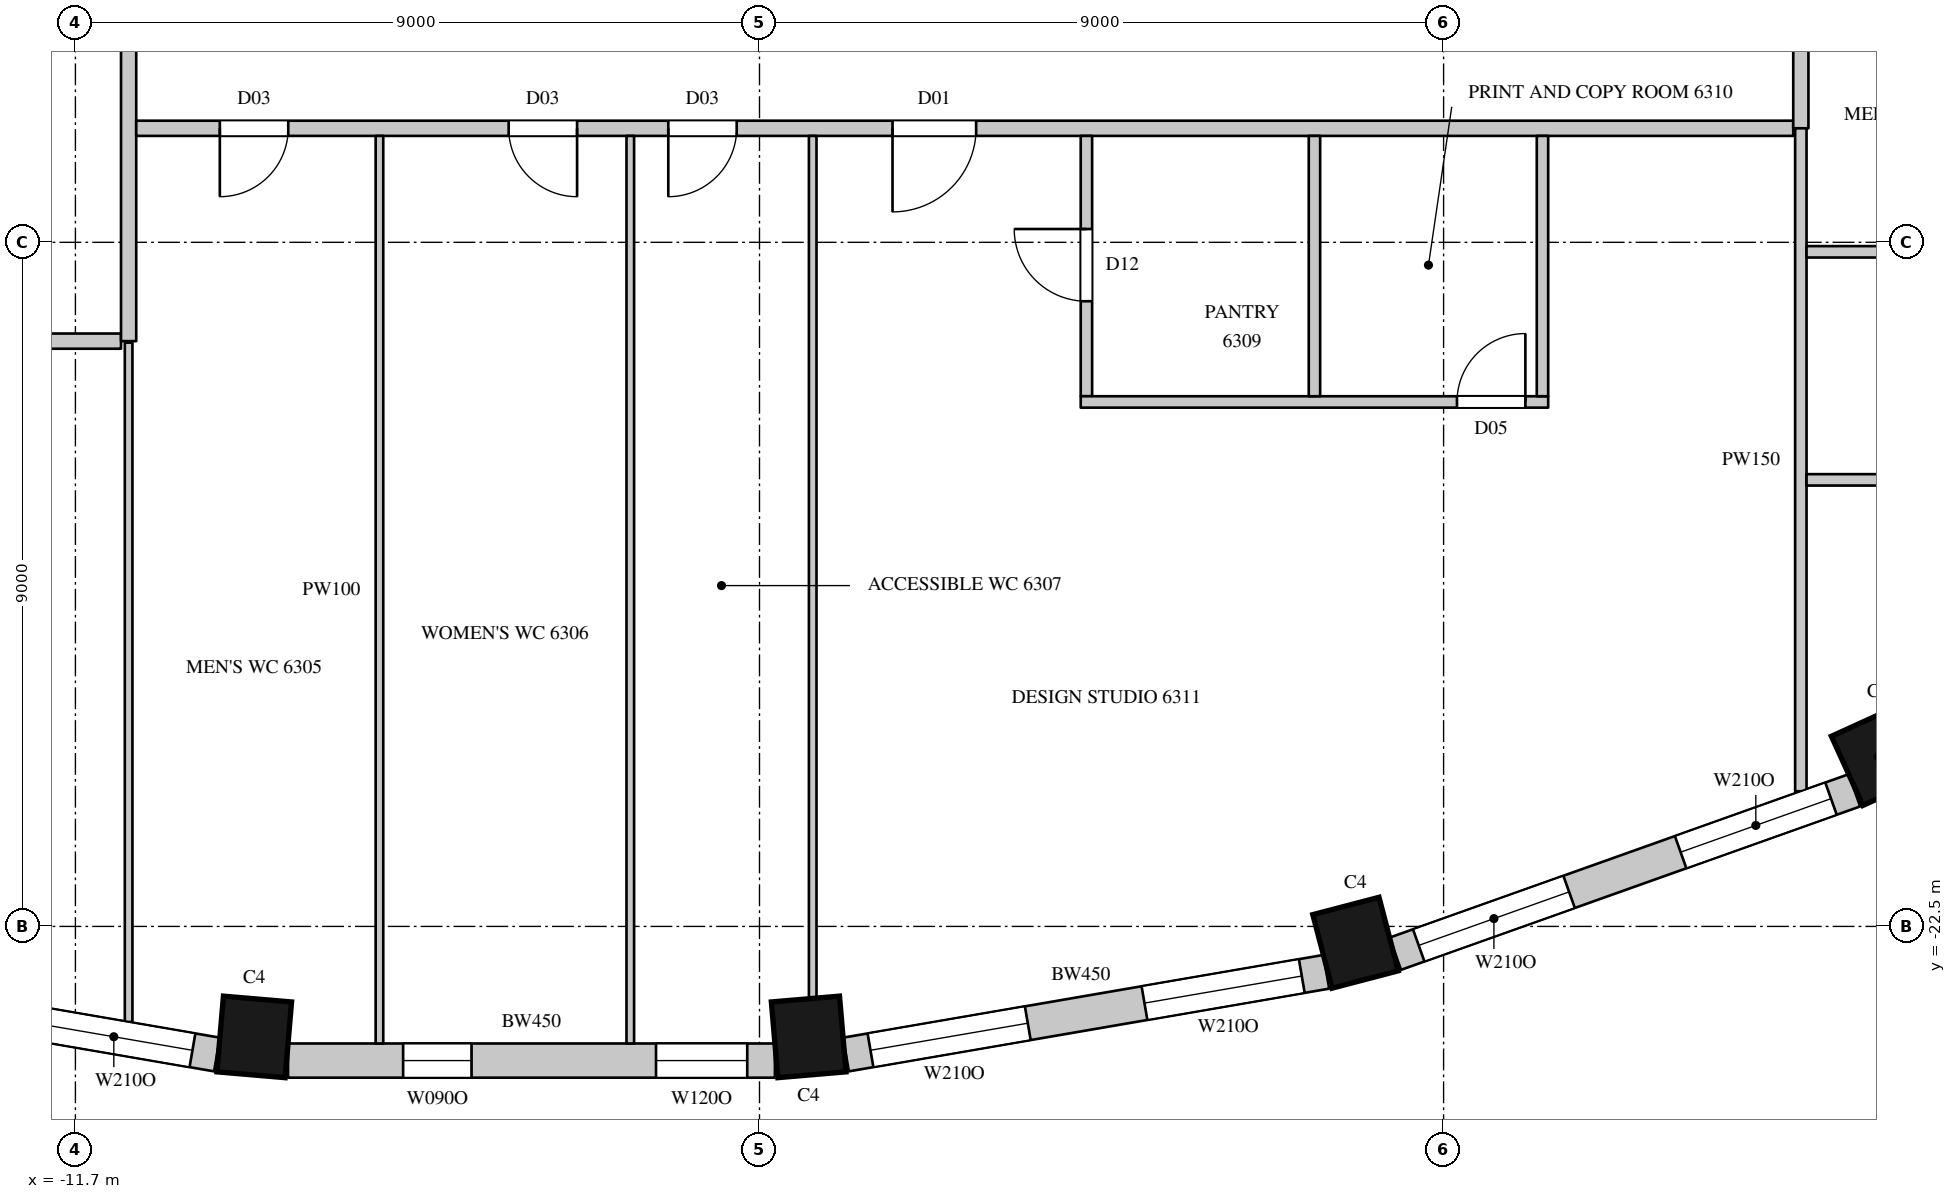
"""IFC4 building model, lengths in metres.
Left out: names, types, materials, properties, quantities, classifications, styles, units other than length and angle.
Written with IfcOpenShell. Run it as: python <this file> out.ifc"""

import sys

from ifc_helpers import new_model, si_unit, direction, frame, frame_2d, origin, origin_2d, place, context, subcontext, project, spatial, rectangle, extrude, element, fill, save


model = new_model("IFC4")
c1 = context("Model", 3, precision=1e-05, world=origin(), true_north=direction((0.0, 1.0)))
c2 = subcontext(c1, "Body", "Model", "MODEL_VIEW")
j1 = project(units=[si_unit("LENGTHUNIT", "METRE"), si_unit("PLANEANGLEUNIT", "RADIAN")], contexts=[c1])
p1 = place(None, origin())
s1 = spatial("IfcSite", under=j1, at=p1, CompositionType="ELEMENT")
p2 = place(p1, origin())
s2 = spatial("IfcBuilding", under=s1, at=p2, CompositionType="ELEMENT")
p3 = place(p2, frame((0.0, 0.0, 280.3)))
s3 = spatial("IfcBuildingStorey", under=s2, at=p3, CompositionType="ELEMENT", Elevation=280.3)
for number, where, z_axis, x_axis in (
    (1, (-9.347, -23.954, 0.0), (0.0, 0.0, 1.0), (0.996, -0.085, 0.0)),
    (2, (-2.053, -23.954, 0.0), (0.0, 0.0, 1.0), (0.996, 0.085, 0.0)),
    (3, (5.142, -22.715, 0.0), (0.0, 0.0, 1.0), (0.967, 0.253, 0.0)),
    (4, (12.019, -20.267, 0.0), (0.0, 0.0, 1.0), (0.91, 0.415, 0.0)),
):
    element("IfcColumn", number, at=place(p3, frame(where, z_axis=z_axis, x_axis=x_axis)), inside=s3, PredefinedType="COLUMN", context=c2, shape_type="SweptSolid", body=[
        extrude(rectangle(XDim=0.9, YDim=1.0, at=origin_2d()), origin(), (0.0, 0.0, 1.0), 4.1),
    ])
p4 = place(p3, frame((-16.157, -23.097, 0.0), z_axis=(0.0, 0.0, 1.0), x_axis=(0.985502073964, -0.169663379113, 0.0)))
e5 = element("IfcWall", 5, at=p4, inside=s3, PredefinedType="SOLIDWALL", context=c2, shape_type="SweptSolid", body=[
    extrude(rectangle(XDim=6.412, YDim=0.45, at=frame_2d((3.206, 0.0))), origin(), (0.0, 0.0, 1.0), 3.8),
])
p5 = place(p4, frame((0.327, 0.0, 1.05)))
e6 = element("IfcOpeningElement", 6, at=p5, cuts=e5, PredefinedType="OPENING", context=c2, shape_type="SweptSolid", body=[
    extrude(rectangle(XDim=2.1, YDim=2.4, at=frame_2d((1.05, 1.2))), frame((0.0, 0.235, 0.0), z_axis=(0.0, -1.0, 0.0), x_axis=(1.0, 0.0, 0.0)), (0.0, 0.0, 1.0), 0.47),
])
p6 = place(p4, frame((3.985, 0.0, 1.05)))
e7 = element("IfcOpeningElement", 7, at=p6, cuts=e5, PredefinedType="OPENING", context=c2, shape_type="SweptSolid", body=[
    extrude(rectangle(XDim=2.1, YDim=2.4, at=frame_2d((1.05, 1.2))), frame((0.0, 0.235, 0.0), z_axis=(0.0, -1.0, 0.0), x_axis=(1.0, 0.0, 0.0)), (0.0, 0.0, 1.0), 0.47),
])
p7 = place(p3, frame((-8.903, -24.265, 0.0), z_axis=(0.0, 0.0, 1.0), x_axis=(1.0, 0.0, 0.0)))
e8 = element("IfcWall", 8, at=p7, inside=s3, PredefinedType="SOLIDWALL", context=c2, shape_type="SweptSolid", body=[
    extrude(rectangle(XDim=6.406, YDim=0.45, at=frame_2d((3.203, 0.0))), origin(), (0.0, 0.0, 1.0), 3.8),
])
p8 = place(p7, frame((1.514, 0.0, 1.05)))
e9 = element("IfcOpeningElement", 9, at=p8, cuts=e8, PredefinedType="OPENING", context=c2, shape_type="SweptSolid", body=[
    extrude(rectangle(XDim=0.9, YDim=2.4, at=frame_2d((0.45, 1.2))), frame((0.0, 0.235, 0.0), z_axis=(0.0, -1.0, 0.0), x_axis=(1.0, 0.0, 0.0)), (0.0, 0.0, 1.0), 0.47),
])
p9 = place(p7, frame((4.841, 0.0, 1.05)))
e10 = element("IfcOpeningElement", 10, at=p9, cuts=e8, PredefinedType="OPENING", context=c2, shape_type="SweptSolid", body=[
    extrude(rectangle(XDim=1.2, YDim=2.4, at=frame_2d((0.6, 1.2))), frame((0.0, 0.235, 0.0), z_axis=(0.0, -1.0, 0.0), x_axis=(1.0, 0.0, 0.0)), (0.0, 0.0, 1.0), 0.47),
])
p10 = place(p3, frame((-1.562, -24.185, 0.0), z_axis=(0.0, 0.0, 1.0), x_axis=(0.985502073964, 0.169663379113, 0.0)))
e11 = element("IfcWall", 11, at=p10, inside=s3, PredefinedType="SOLIDWALL", context=c2, shape_type="SweptSolid", body=[
    extrude(rectangle(XDim=6.412, YDim=0.45, at=frame_2d((3.206, 0.0))), origin(), (0.0, 0.0, 1.0), 3.8),
])
p11 = place(p10, frame((0.327, 0.0, 1.05)))
e12 = element("IfcOpeningElement", 12, at=p11, cuts=e11, PredefinedType="OPENING", context=c2, shape_type="SweptSolid", body=[
    extrude(rectangle(XDim=2.1, YDim=2.4, at=frame_2d((1.05, 1.2))), frame((0.0, 0.235, 0.0), z_axis=(0.0, -1.0, 0.0), x_axis=(1.0, 0.0, 0.0)), (0.0, 0.0, 1.0), 0.47),
])
p12 = place(p10, frame((3.985, 0.0, 1.05)))
e13 = element("IfcOpeningElement", 13, at=p12, cuts=e11, PredefinedType="OPENING", context=c2, shape_type="SweptSolid", body=[
    extrude(rectangle(XDim=2.1, YDim=2.4, at=frame_2d((1.05, 1.2))), frame((0.0, 0.235, 0.0), z_axis=(0.0, -1.0, 0.0), x_axis=(1.0, 0.0, 0.0)), (0.0, 0.0, 1.0), 0.47),
])
p13 = place(p3, frame((5.665, -22.859, 0.0), z_axis=(0.0, 0.0, 1.0), x_axis=(0.942108340262, 0.335308626803, 0.0)))
e14 = element("IfcWall", 14, at=p13, inside=s3, PredefinedType="SOLIDWALL", context=c2, shape_type="SweptSolid", body=[
    extrude(rectangle(XDim=6.412, YDim=0.45, at=frame_2d((3.206, 0.0))), origin(), (0.0, 0.0, 1.0), 3.8),
])
p14 = place(p13, frame((0.327, 0.0, 1.05)))
e15 = element("IfcOpeningElement", 15, at=p14, cuts=e14, PredefinedType="OPENING", context=c2, shape_type="SweptSolid", body=[
    extrude(rectangle(XDim=2.1, YDim=2.4, at=frame_2d((1.05, 1.2))), frame((0.0, 0.235, 0.0), z_axis=(0.0, -1.0, 0.0), x_axis=(1.0, 0.0, 0.0)), (0.0, 0.0, 1.0), 0.47),
])
p15 = place(p13, frame((3.985, 0.0, 1.05)))
e16 = element("IfcOpeningElement", 16, at=p15, cuts=e14, PredefinedType="OPENING", context=c2, shape_type="SweptSolid", body=[
    extrude(rectangle(XDim=2.1, YDim=2.4, at=frame_2d((1.05, 1.2))), frame((0.0, 0.235, 0.0), z_axis=(0.0, -1.0, 0.0), x_axis=(1.0, 0.0, 0.0)), (0.0, 0.0, 1.0), 0.47),
])
p16 = place(p3, frame((-13.97, -14.8, 0.0), z_axis=(0.0, 0.0, 1.0), x_axis=(1.0, 0.0, 0.0)))
e17 = element("IfcWall", 17, at=p16, inside=s3, PredefinedType="PARTITIONING", context=c2, shape_type="SweptSolid", body=[
    extrude(rectangle(XDim=2.87, YDim=0.2, at=frame_2d((1.435, 0.0))), origin(), (0.0, 0.0, 1.0), 3.8),
])
p17 = place(p3, frame((-11.0, -14.8, 0.0), z_axis=(0.0, 0.0, 1.0), x_axis=(0.0, 1.0, 0.0)))
e18 = element("IfcWall", 18, at=p17, inside=s3, PredefinedType="PARTITIONING", context=c2, shape_type="SweptSolid", body=[
    extrude(rectangle(XDim=29.6, YDim=0.2, at=frame_2d((14.8, 0.0))), origin(), (0.0, 0.0, 1.0), 3.8),
])
p18 = place(p17, frame((14.15, 0.0, 0.0)))
e19 = element("IfcOpeningElement", 19, at=p18, cuts=e18, PredefinedType="OPENING", context=c2, shape_type="SweptSolid", body=[
    extrude(rectangle(XDim=1.5, YDim=2.4, at=frame_2d((0.75, 1.2))), frame((0.0, 0.11, 0.0), z_axis=(0.0, -1.0, 0.0), x_axis=(1.0, 0.0, 0.0)), (0.0, 0.0, 1.0), 0.22),
])
p19 = place(p3, frame((-10.9, -12.0, 0.0), z_axis=(0.0, 0.0, 1.0), x_axis=(1.0, 0.0, 0.0)))
e20 = element("IfcWall", 20, at=p19, inside=s3, PredefinedType="PARTITIONING", context=c2, shape_type="SweptSolid", body=[
    extrude(rectangle(XDim=21.8, YDim=0.2, at=frame_2d((10.9, 0.0))), origin(), (0.0, 0.0, 1.0), 3.8),
])
p20 = place(p19, frame((1.1, 0.0, 0.0)))
e21 = element("IfcOpeningElement", 21, at=p20, cuts=e20, PredefinedType="OPENING", context=c2, shape_type="SweptSolid", body=[
    extrude(rectangle(XDim=0.9, YDim=2.2, at=frame_2d((0.45, 1.1))), frame((0.0, 0.11, 0.0), z_axis=(0.0, -1.0, 0.0), x_axis=(1.0, 0.0, 0.0)), (0.0, 0.0, 1.0), 0.22),
])
p21 = place(p19, frame((4.9, 0.0, 0.0)))
e22 = element("IfcOpeningElement", 22, at=p21, cuts=e20, PredefinedType="OPENING", context=c2, shape_type="SweptSolid", body=[
    extrude(rectangle(XDim=0.9, YDim=2.2, at=frame_2d((0.45, 1.1))), frame((0.0, 0.11, 0.0), z_axis=(0.0, -1.0, 0.0), x_axis=(1.0, 0.0, 0.0)), (0.0, 0.0, 1.0), 0.22),
])
p22 = place(p19, frame((7.0, 0.0, 0.0)))
e23 = element("IfcOpeningElement", 23, at=p22, cuts=e20, PredefinedType="OPENING", context=c2, shape_type="SweptSolid", body=[
    extrude(rectangle(XDim=0.9, YDim=2.2, at=frame_2d((0.45, 1.1))), frame((0.0, 0.11, 0.0), z_axis=(0.0, -1.0, 0.0), x_axis=(1.0, 0.0, 0.0)), (0.0, 0.0, 1.0), 0.22),
])
p23 = place(p19, frame((9.95, 0.0, 0.0)))
e24 = element("IfcOpeningElement", 24, at=p23, cuts=e20, PredefinedType="OPENING", context=c2, shape_type="SweptSolid", body=[
    extrude(rectangle(XDim=1.1, YDim=2.4, at=frame_2d((0.55, 1.2))), frame((0.0, 0.11, 0.0), z_axis=(0.0, -1.0, 0.0), x_axis=(1.0, 0.0, 0.0)), (0.0, 0.0, 1.0), 0.22),
])
p24 = place(p3, frame((11.0, -12.0, 0.0), z_axis=(0.0, 0.0, 1.0), x_axis=(0.0, 1.0, 0.0)))
e25 = element("IfcWall", 25, at=p24, inside=s3, PredefinedType="PARTITIONING", context=c2, shape_type="SweptSolid", body=[
    extrude(rectangle(XDim=24.1, YDim=0.2, at=frame_2d((12.05, 0.0))), origin(), (0.0, 0.0, 1.0), 3.8),
])
p25 = place(p24, frame((9.85, 0.0, 0.0)))
e26 = element("IfcOpeningElement", 26, at=p25, cuts=e25, PredefinedType="OPENING", context=c2, shape_type="SweptSolid", body=[
    extrude(rectangle(XDim=1.5, YDim=2.4, at=frame_2d((0.75, 1.2))), frame((0.0, 0.11, 0.0), z_axis=(0.0, -1.0, 0.0), x_axis=(1.0, 0.0, 0.0)), (0.0, 0.0, 1.0), 0.22),
])
p26 = place(p24, frame((4.55, 0.0, 0.0)))
e27 = element("IfcOpeningElement", 27, at=p26, cuts=e25, PredefinedType="OPENING", context=c2, shape_type="SweptSolid", body=[
    extrude(rectangle(XDim=1.1, YDim=2.4, at=frame_2d((0.55, 1.2))), frame((0.0, 0.11, 0.0), z_axis=(0.0, -1.0, 0.0), x_axis=(1.0, 0.0, 0.0)), (0.0, 0.0, 1.0), 0.22),
])
p27 = place(p3, frame((1.601, -15.525, 0.0), z_axis=(0.0, 0.0, 1.0), x_axis=(0.0, 1.0, 0.0)))
e28 = element("IfcWall", 28, at=p27, inside=s3, PredefinedType="PARTITIONING", context=c2, shape_type="SweptSolid", body=[
    extrude(rectangle(XDim=3.425, YDim=0.15, at=frame_2d((1.712, 0.0))), origin(), (0.0, 0.0, 1.0), 3.8),
])
p28 = place(p27, frame((1.25, 0.0, 0.0)))
e29 = element("IfcOpeningElement", 29, at=p28, cuts=e28, PredefinedType="OPENING", context=c2, shape_type="SweptSolid", body=[
    extrude(rectangle(XDim=0.95, YDim=2.2, at=frame_2d((0.475, 1.1))), frame((0.0, 0.085, 0.0), z_axis=(0.0, -1.0, 0.0), x_axis=(1.0, 0.0, 0.0)), (0.0, 0.0, 1.0), 0.17),
])
p29 = place(p3, frame((1.526, -15.6, 0.0), z_axis=(0.0, 0.0, 1.0), x_axis=(1.0, 0.0, 0.0)))
e30 = element("IfcWall", 30, at=p29, inside=s3, PredefinedType="PARTITIONING", context=c2, shape_type="SweptSolid", body=[
    extrude(rectangle(XDim=6.15, YDim=0.15, at=frame_2d((3.075, 0.0))), origin(), (0.0, 0.0, 1.0), 3.8),
])
p30 = place(p29, frame((4.95, 0.0, 0.0)))
e31 = element("IfcOpeningElement", 31, at=p30, cuts=e30, PredefinedType="OPENING", context=c2, shape_type="SweptSolid", body=[
    extrude(rectangle(XDim=0.9, YDim=2.2, at=frame_2d((0.45, 1.1))), frame((0.0, 0.085, 0.0), z_axis=(0.0, -1.0, 0.0), x_axis=(1.0, 0.0, 0.0)), (0.0, 0.0, 1.0), 0.17),
])
for number, where, z_axis, x_axis in (
    (32, (4.601, -15.525, 0.0), (0.0, 0.0, 1.0), (0.0, 1.0, 0.0)),
    (33, (7.601, -15.525, 0.0), (0.0, 0.0, 1.0), (0.0, 1.0, 0.0)),
):
    element("IfcWall", number, at=place(p3, frame(where, z_axis=z_axis, x_axis=x_axis)), inside=s3, PredefinedType="PARTITIONING", context=c2, shape_type="SweptSolid", body=[
        extrude(rectangle(XDim=3.425, YDim=0.15, at=frame_2d((1.712, 0.0))), origin(), (0.0, 0.0, 1.0), 3.8),
    ])
p31 = place(p3, frame((11.0, -20.721, 0.0), z_axis=(0.0, 0.0, 1.0), x_axis=(0.0, 1.0, 0.0)))
e34 = element("IfcWall", 34, at=p31, inside=s3, PredefinedType="PARTITIONING", context=c2, shape_type="SweptSolid", body=[
    extrude(rectangle(XDim=8.721, YDim=0.15, at=frame_2d((4.361, 0.0))), origin(), (0.0, 0.0, 1.0), 3.8),
])
p32 = place(p3, frame((11.075, -16.625, 0.0), z_axis=(0.0, 0.0, 1.0), x_axis=(1.0, 0.0, 0.0)))
e35 = element("IfcWall", 35, at=p32, inside=s3, PredefinedType="PARTITIONING", context=c2, shape_type="SweptSolid", body=[
    extrude(rectangle(XDim=3.9, YDim=0.15, at=frame_2d((1.95, 0.0))), origin(), (0.0, 0.0, 1.0), 3.8),
])
p33 = place(p32, frame((1.4, 0.0, 0.0)))
e36 = element("IfcOpeningElement", 36, at=p33, cuts=e35, PredefinedType="OPENING", context=c2, shape_type="SweptSolid", body=[
    extrude(rectangle(XDim=0.95, YDim=2.2, at=frame_2d((0.475, 1.1))), frame((0.0, 0.085, 0.0), z_axis=(0.0, -1.0, 0.0), x_axis=(1.0, 0.0, 0.0)), (0.0, 0.0, 1.0), 0.17),
])
p34 = place(p3, frame((11.075, -13.625, 0.0), z_axis=(0.0, 0.0, 1.0), x_axis=(1.0, 0.0, 0.0)))
e37 = element("IfcWall", 37, at=p34, inside=s3, PredefinedType="PARTITIONING", context=c2, shape_type="SweptSolid", body=[
    extrude(rectangle(XDim=3.75, YDim=0.15, at=frame_2d((1.875, 0.0))), origin(), (0.0, 0.0, 1.0), 3.8),
])
p35 = place(p3, frame((-11.0, -23.757, 0.0), z_axis=(0.0, 0.0, 1.0), x_axis=(0.0, 1.0, 0.0)))
e38 = element("IfcWall", 38, at=p35, inside=s3, PredefinedType="PARTITIONING", context=c2, shape_type="SweptSolid", body=[
    extrude(rectangle(XDim=8.937, YDim=0.1, at=frame_2d((4.468, 0.0))), origin(), (0.0, 0.0, 1.0), 3.8),
])
for number, where, z_axis, x_axis in (
    (39, (-7.7, -24.04, 0.0), (0.0, 0.0, 1.0), (0.0, 1.0, 0.0)),
    (40, (-4.4, -24.04, 0.0), (0.0, 0.0, 1.0), (0.0, 1.0, 0.0)),
):
    element("IfcWall", number, at=place(p3, frame(where, z_axis=z_axis, x_axis=x_axis)), inside=s3, PredefinedType="PARTITIONING", context=c2, shape_type="SweptSolid", body=[
        extrude(rectangle(XDim=11.94, YDim=0.1, at=frame_2d((5.97, 0.0))), origin(), (0.0, 0.0, 1.0), 3.8),
    ])
p36 = place(p3, frame((-2.0, -23.447, 0.0), z_axis=(0.0, 0.0, 1.0), x_axis=(0.0, 1.0, 0.0)))
e41 = element("IfcWall", 41, at=p36, inside=s3, PredefinedType="PARTITIONING", context=c2, shape_type="SweptSolid", body=[
    extrude(rectangle(XDim=11.347, YDim=0.1, at=frame_2d((5.674, 0.0))), origin(), (0.0, 0.0, 1.0), 3.8),
])
p37 = place(p6, origin())
e42 = element("IfcWindow", 42, at=p37, inside=s3, PartitioningType="SINGLE_PANEL", PredefinedType="WINDOW", context=c2, shape_type="SweptSolid", body=[
    extrude(rectangle(XDim=2.1, YDim=2.4, at=frame_2d((1.05, 1.2))), frame((0.0, 0.135, 0.0), z_axis=(0.0, -1.0, 0.0), x_axis=(1.0, 0.0, 0.0)), (0.0, 0.0, 1.0), 0.06),
])
fill(e7, e42)
p38 = place(p11, origin())
e43 = element("IfcWindow", 43, at=p38, inside=s3, PartitioningType="SINGLE_PANEL", PredefinedType="WINDOW", context=c2, shape_type="SweptSolid", body=[
    extrude(rectangle(XDim=2.1, YDim=2.4, at=frame_2d((1.05, 1.2))), frame((0.0, 0.135, 0.0), z_axis=(0.0, -1.0, 0.0), x_axis=(1.0, 0.0, 0.0)), (0.0, 0.0, 1.0), 0.06),
])
fill(e12, e43)
p39 = place(p12, origin())
e44 = element("IfcWindow", 44, at=p39, inside=s3, PartitioningType="SINGLE_PANEL", PredefinedType="WINDOW", context=c2, shape_type="SweptSolid", body=[
    extrude(rectangle(XDim=2.1, YDim=2.4, at=frame_2d((1.05, 1.2))), frame((0.0, 0.135, 0.0), z_axis=(0.0, -1.0, 0.0), x_axis=(1.0, 0.0, 0.0)), (0.0, 0.0, 1.0), 0.06),
])
fill(e13, e44)
p40 = place(p14, origin())
e45 = element("IfcWindow", 45, at=p40, inside=s3, PartitioningType="SINGLE_PANEL", PredefinedType="WINDOW", context=c2, shape_type="SweptSolid", body=[
    extrude(rectangle(XDim=2.1, YDim=2.4, at=frame_2d((1.05, 1.2))), frame((0.0, 0.135, 0.0), z_axis=(0.0, -1.0, 0.0), x_axis=(1.0, 0.0, 0.0)), (0.0, 0.0, 1.0), 0.06),
])
fill(e15, e45)
p41 = place(p15, origin())
e46 = element("IfcWindow", 46, at=p41, inside=s3, PartitioningType="SINGLE_PANEL", PredefinedType="WINDOW", context=c2, shape_type="SweptSolid", body=[
    extrude(rectangle(XDim=2.1, YDim=2.4, at=frame_2d((1.05, 1.2))), frame((0.0, 0.135, 0.0), z_axis=(0.0, -1.0, 0.0), x_axis=(1.0, 0.0, 0.0)), (0.0, 0.0, 1.0), 0.06),
])
fill(e16, e46)
p42 = place(p20, origin())
e47 = element("IfcDoor", 47, at=p42, inside=s3, OperationType="SINGLE_SWING_RIGHT", PredefinedType="DOOR", context=c2, shape_type="SweptSolid", body=[
    extrude(rectangle(XDim=0.9, YDim=2.2, at=frame_2d((0.45, 1.1))), frame((0.0, 0.025, 0.0), z_axis=(0.0, -1.0, 0.0), x_axis=(1.0, 0.0, 0.0)), (0.0, 0.0, 1.0), 0.05),
])
fill(e21, e47)
p43 = place(p21, origin())
e48 = element("IfcDoor", 48, at=p43, inside=s3, OperationType="SINGLE_SWING_LEFT", PredefinedType="DOOR", context=c2, shape_type="SweptSolid", body=[
    extrude(rectangle(XDim=0.9, YDim=2.2, at=frame_2d((0.45, 1.1))), frame((0.0, 0.025, 0.0), z_axis=(0.0, -1.0, 0.0), x_axis=(1.0, 0.0, 0.0)), (0.0, 0.0, 1.0), 0.05),
])
fill(e22, e48)
p44 = place(p22, origin())
e49 = element("IfcDoor", 49, at=p44, inside=s3, OperationType="SINGLE_SWING_RIGHT", PredefinedType="DOOR", context=c2, shape_type="SweptSolid", body=[
    extrude(rectangle(XDim=0.9, YDim=2.2, at=frame_2d((0.45, 1.1))), frame((0.0, 0.025, 0.0), z_axis=(0.0, -1.0, 0.0), x_axis=(1.0, 0.0, 0.0)), (0.0, 0.0, 1.0), 0.05),
])
fill(e23, e49)
p45 = place(p23, origin())
e50 = element("IfcDoor", 50, at=p45, inside=s3, OperationType="SINGLE_SWING_RIGHT", PredefinedType="DOOR", context=c2, shape_type="SweptSolid", body=[
    extrude(rectangle(XDim=1.1, YDim=2.4, at=frame_2d((0.55, 1.2))), frame((0.0, 0.025, 0.0), z_axis=(0.0, -1.0, 0.0), x_axis=(1.0, 0.0, 0.0)), (0.0, 0.0, 1.0), 0.05),
])
fill(e24, e50)
p46 = place(p28, origin())
e51 = element("IfcDoor", 51, at=p46, inside=s3, OperationType="SINGLE_SWING_RIGHT", PredefinedType="DOOR", context=c2, shape_type="SweptSolid", body=[
    extrude(rectangle(XDim=0.95, YDim=2.2, at=frame_2d((0.475, 1.1))), frame((0.0, 0.025, 0.0), z_axis=(0.0, -1.0, 0.0), x_axis=(1.0, 0.0, 0.0)), (0.0, 0.0, 1.0), 0.05),
])
fill(e29, e51)
p47 = place(p30, origin())
e52 = element("IfcDoor", 52, at=p47, inside=s3, OperationType="SINGLE_SWING_RIGHT", PredefinedType="DOOR", context=c2, shape_type="SweptSolid", body=[
    extrude(rectangle(XDim=0.9, YDim=2.2, at=frame_2d((0.45, 1.1))), frame((0.0, 0.025, 0.0), z_axis=(0.0, -1.0, 0.0), x_axis=(1.0, 0.0, 0.0)), (0.0, 0.0, 1.0), 0.05),
])
fill(e31, e52)
p48 = place(p8, origin())
e53 = element("IfcWindow", 53, at=p48, inside=s3, PartitioningType="SINGLE_PANEL", PredefinedType="WINDOW", context=c2, shape_type="SweptSolid", body=[
    extrude(rectangle(XDim=0.9, YDim=2.4, at=frame_2d((0.45, 1.2))), frame((0.0, 0.135, 0.0), z_axis=(0.0, -1.0, 0.0), x_axis=(1.0, 0.0, 0.0)), (0.0, 0.0, 1.0), 0.06),
])
fill(e9, e53)
p49 = place(p9, origin())
e54 = element("IfcWindow", 54, at=p49, inside=s3, PartitioningType="SINGLE_PANEL", PredefinedType="WINDOW", context=c2, shape_type="SweptSolid", body=[
    extrude(rectangle(XDim=1.2, YDim=2.4, at=frame_2d((0.6, 1.2))), frame((0.0, 0.135, 0.0), z_axis=(0.0, -1.0, 0.0), x_axis=(1.0, 0.0, 0.0)), (0.0, 0.0, 1.0), 0.06),
])
fill(e10, e54)
save(model, sys.argv[1])
